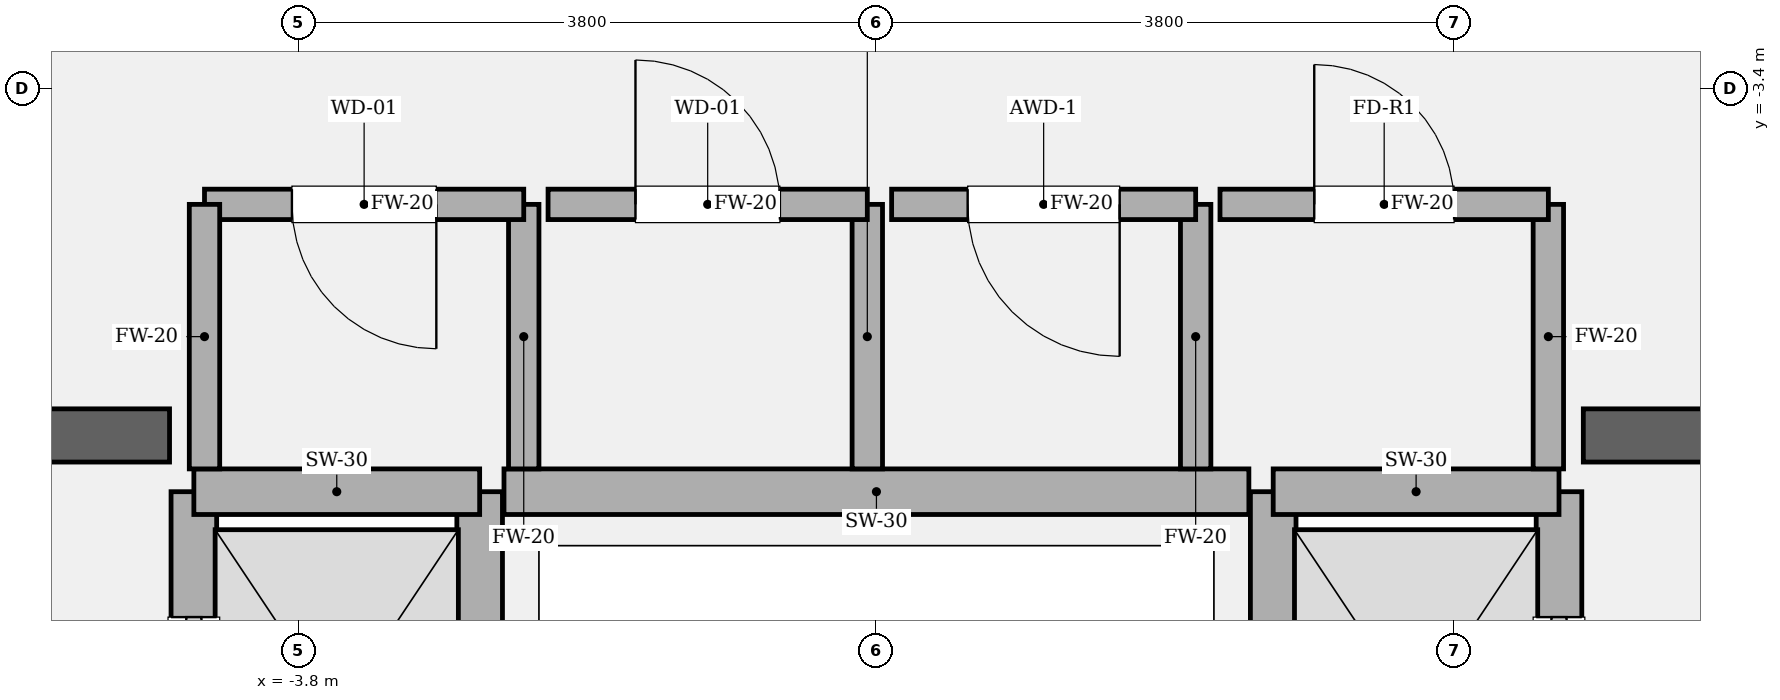
"""IFC4 building model, lengths in metres.
Left out: names, types, materials, properties, quantities, classifications, styles, units other than length and angle.
Written with IfcOpenShell. Run it as: python <this file> out.ifc"""

import sys

from ifc_helpers import new_model, si_unit, direction, frame, frame_2d, origin, place, context, subcontext, project, spatial, rectangle, extrude, element, fill, save


model = new_model("IFC4")
c1 = context("Model", 3, precision=1e-05, world=origin(), true_north=direction((0.0, 1.0)))
c2 = subcontext(c1, "Body", "Model", "MODEL_VIEW")
j1 = project(units=[si_unit("LENGTHUNIT", "METRE"), si_unit("PLANEANGLEUNIT", "RADIAN")], contexts=[c1])
p1 = place(None, origin())
s1 = spatial("IfcSite", under=j1, at=p1, CompositionType="ELEMENT")
p2 = place(p1, origin())
s2 = spatial("IfcBuilding", under=s1, at=p2, CompositionType="ELEMENT")
p3 = place(p2, frame((0.0, 0.0, 130.2)))
s3 = spatial("IfcBuildingStorey", under=s2, at=p3, CompositionType="ELEMENT", Elevation=130.2)
p4 = place(p3, frame((-9.875, -5.68, 0.0), z_axis=(0.0, 0.0, 1.0), x_axis=(1.0, 0.0, 0.0)))
e1 = element("IfcWall", 1, at=p4, inside=s3, PredefinedType="SOLIDWALL", context=c2, shape_type="SweptSolid", body=[
    extrude(rectangle(XDim=5.225, YDim=0.35, at=frame_2d((2.613, 0.0))), origin(), (0.0, 0.0, 1.0), 4.8),
])
p5 = place(p4, frame((1.335, 0.0, 0.0)))
e2 = element("IfcOpeningElement", 2, at=p5, cuts=e1, PredefinedType="OPENING", context=c2, shape_type="SweptSolid", body=[
    extrude(rectangle(XDim=1.18, YDim=2.2, at=frame_2d((0.59, 1.1))), frame((0.0, 0.185, 0.0), z_axis=(0.0, -1.0, 0.0), x_axis=(1.0, 0.0, 0.0)), (0.0, 0.0, 1.0), 0.37),
])
p6 = place(p3, frame((4.65, -5.68, 0.0), z_axis=(0.0, 0.0, 1.0), x_axis=(1.0, 0.0, 0.0)))
e3 = element("IfcWall", 3, at=p6, inside=s3, PredefinedType="SOLIDWALL", context=c2, shape_type="SweptSolid", body=[
    extrude(rectangle(XDim=5.225, YDim=0.35, at=frame_2d((2.613, 0.0))), origin(), (0.0, 0.0, 1.0), 4.8),
])
p7 = place(p6, frame((2.71, 0.0, 0.0)))
e4 = element("IfcOpeningElement", 4, at=p7, cuts=e3, PredefinedType="OPENING", context=c2, shape_type="SweptSolid", body=[
    extrude(rectangle(XDim=1.18, YDim=2.2, at=frame_2d((0.59, 1.1))), frame((0.0, 0.185, 0.0), z_axis=(0.0, -1.0, 0.0), x_axis=(1.0, 0.0, 0.0)), (0.0, 0.0, 1.0), 0.37),
])
p8 = place(p3, frame((-4.49, -8.82, 0.0), z_axis=(0.0, 0.0, 1.0), x_axis=(0.0, 1.0, 0.0)))
e5 = element("IfcWall", 5, at=p8, inside=s3, PredefinedType="SOLIDWALL", context=c2, shape_type="SweptSolid", body=[
    extrude(rectangle(XDim=2.77, YDim=0.3, at=frame_2d((1.385, 0.0))), origin(), (0.0, 0.0, 1.0), 4.54),
])
p9 = place(p8, frame((0.825, 0.0, 0.0)))
e6 = element("IfcOpeningElement", 6, at=p9, cuts=e5, PredefinedType="OPENING", context=c2, shape_type="SweptSolid", body=[
    extrude(rectangle(XDim=1.12, YDim=2.25, at=frame_2d((0.56, 1.125))), frame((0.0, 0.16, 0.0), z_axis=(0.0, -1.0, 0.0), x_axis=(1.0, 0.0, 0.0)), (0.0, 0.0, 1.0), 0.32),
])
p10 = place(p3, frame((-2.61, -8.82, 0.0), z_axis=(0.0, 0.0, 1.0), x_axis=(0.0, 1.0, 0.0)))
e7 = element("IfcWall", 7, at=p10, inside=s3, PredefinedType="SOLIDWALL", context=c2, shape_type="SweptSolid", body=[
    extrude(rectangle(XDim=2.77, YDim=0.3, at=frame_2d((1.385, 0.0))), origin(), (0.0, 0.0, 1.0), 4.54),
])
p11 = place(p3, frame((-4.49, -6.05, 0.0), z_axis=(0.0, 0.0, 1.0), x_axis=(1.0, 0.0, 0.0)))
e8 = element("IfcWall", 8, at=p11, inside=s3, PredefinedType="SOLIDWALL", context=c2, shape_type="SweptSolid", body=[
    extrude(rectangle(XDim=1.88, YDim=0.3, at=frame_2d((0.94, 0.0))), origin(), (0.0, 0.0, 1.0), 4.54),
])
p12 = place(p3, frame((4.49, -8.82, 0.0), z_axis=(0.0, 0.0, 1.0), x_axis=(0.0, 1.0, 0.0)))
e9 = element("IfcWall", 9, at=p12, inside=s3, PredefinedType="SOLIDWALL", context=c2, shape_type="SweptSolid", body=[
    extrude(rectangle(XDim=2.77, YDim=0.3, at=frame_2d((1.385, 0.0))), origin(), (0.0, 0.0, 1.0), 4.54),
])
p13 = place(p12, frame((0.825, 0.0, 0.0)))
e10 = element("IfcOpeningElement", 10, at=p13, cuts=e9, PredefinedType="OPENING", context=c2, shape_type="SweptSolid", body=[
    extrude(rectangle(XDim=1.12, YDim=2.25, at=frame_2d((0.56, 1.125))), frame((0.0, 0.16, 0.0), z_axis=(0.0, -1.0, 0.0), x_axis=(1.0, 0.0, 0.0)), (0.0, 0.0, 1.0), 0.32),
])
p14 = place(p3, frame((2.61, -8.82, 0.0), z_axis=(0.0, 0.0, 1.0), x_axis=(0.0, 1.0, 0.0)))
e11 = element("IfcWall", 11, at=p14, inside=s3, PredefinedType="SOLIDWALL", context=c2, shape_type="SweptSolid", body=[
    extrude(rectangle(XDim=2.77, YDim=0.3, at=frame_2d((1.385, 0.0))), origin(), (0.0, 0.0, 1.0), 4.54),
])
p15 = place(p3, frame((2.61, -6.05, 0.0), z_axis=(0.0, 0.0, 1.0), x_axis=(1.0, 0.0, 0.0)))
e12 = element("IfcWall", 12, at=p15, inside=s3, PredefinedType="SOLIDWALL", context=c2, shape_type="SweptSolid", body=[
    extrude(rectangle(XDim=1.88, YDim=0.3, at=frame_2d((0.94, 0.0))), origin(), (0.0, 0.0, 1.0), 4.54),
])
p16 = place(p3, frame((-2.45, -6.05, 0.0), z_axis=(0.0, 0.0, 1.0), x_axis=(1.0, 0.0, 0.0)))
e13 = element("IfcWall", 13, at=p16, inside=s3, PredefinedType="SOLIDWALL", context=c2, shape_type="SweptSolid", body=[
    extrude(rectangle(XDim=4.9, YDim=0.3, at=frame_2d((2.45, 0.0))), origin(), (0.0, 0.0, 1.0), 4.54),
])
p17 = place(p3, frame((-2.32, -5.9, 0.0), z_axis=(0.0, 0.0, 1.0), x_axis=(0.0, 1.0, 0.0)))
e14 = element("IfcWall", 14, at=p17, inside=s3, PredefinedType="SOLIDWALL", context=c2, shape_type="SweptSolid", body=[
    extrude(rectangle(XDim=1.74, YDim=0.2, at=frame_2d((0.87, 0.0))), origin(), (0.0, 0.0, 1.0), 4.54),
])
p18 = place(p3, frame((-2.32, -4.16, 0.0), z_axis=(0.0, 0.0, 1.0), x_axis=(-1.0, 0.0, 0.0)))
e15 = element("IfcWall", 15, at=p18, inside=s3, PredefinedType="SOLIDWALL", context=c2, shape_type="SweptSolid", body=[
    extrude(rectangle(XDim=2.1, YDim=0.2, at=frame_2d((1.05, 0.0))), origin(), (0.0, 0.0, 1.0), 4.54),
])
p19 = place(p18, frame((0.575, 0.0, 0.0)))
e16 = element("IfcOpeningElement", 16, at=p19, cuts=e15, PredefinedType="OPENING", context=c2, shape_type="SweptSolid", body=[
    extrude(rectangle(XDim=0.95, YDim=2.15, at=frame_2d((0.475, 1.075))), frame((0.0, 0.11, 0.0), z_axis=(0.0, -1.0, 0.0), x_axis=(1.0, 0.0, 0.0)), (0.0, 0.0, 1.0), 0.22),
])
for number, where, z_axis, x_axis in (
    (17, (-4.42, -4.16, 0.0), (0.0, 0.0, 1.0), (0.0, -1.0, 0.0)),
    (18, (-0.06, -5.9, 0.0), (0.0, 0.0, 1.0), (0.0, 1.0, 0.0)),
):
    element("IfcWall", number, at=place(p3, frame(where, z_axis=z_axis, x_axis=x_axis)), inside=s3, PredefinedType="SOLIDWALL", context=c2, shape_type="SweptSolid", body=[
        extrude(rectangle(XDim=1.74, YDim=0.2, at=frame_2d((0.87, 0.0))), origin(), (0.0, 0.0, 1.0), 4.54),
    ])
p20 = place(p3, frame((-0.06, -4.16, 0.0), z_axis=(0.0, 0.0, 1.0), x_axis=(-1.0, 0.0, 0.0)))
e19 = element("IfcWall", 19, at=p20, inside=s3, PredefinedType="SOLIDWALL", context=c2, shape_type="SweptSolid", body=[
    extrude(rectangle(XDim=2.1, YDim=0.2, at=frame_2d((1.05, 0.0))), origin(), (0.0, 0.0, 1.0), 4.54),
])
p21 = place(p20, frame((0.575, 0.0, 0.0)))
e20 = element("IfcOpeningElement", 20, at=p21, cuts=e19, PredefinedType="OPENING", context=c2, shape_type="SweptSolid", body=[
    extrude(rectangle(XDim=0.95, YDim=2.15, at=frame_2d((0.475, 1.075))), frame((0.0, 0.11, 0.0), z_axis=(0.0, -1.0, 0.0), x_axis=(1.0, 0.0, 0.0)), (0.0, 0.0, 1.0), 0.22),
])
p22 = place(p3, frame((2.1, -5.9, 0.0), z_axis=(0.0, 0.0, 1.0), x_axis=(0.0, 1.0, 0.0)))
e21 = element("IfcWall", 21, at=p22, inside=s3, PredefinedType="SOLIDWALL", context=c2, shape_type="SweptSolid", body=[
    extrude(rectangle(XDim=1.74, YDim=0.2, at=frame_2d((0.87, 0.0))), origin(), (0.0, 0.0, 1.0), 4.54),
])
p23 = place(p3, frame((2.1, -4.16, 0.0), z_axis=(0.0, 0.0, 1.0), x_axis=(-1.0, 0.0, 0.0)))
e22 = element("IfcWall", 22, at=p23, inside=s3, PredefinedType="SOLIDWALL", context=c2, shape_type="SweptSolid", body=[
    extrude(rectangle(XDim=2.0, YDim=0.2, at=frame_2d((1.0, 0.0))), origin(), (0.0, 0.0, 1.0), 4.54),
])
p24 = place(p23, frame((0.5, 0.0, 0.0)))
e23 = element("IfcOpeningElement", 23, at=p24, cuts=e22, PredefinedType="OPENING", context=c2, shape_type="SweptSolid", body=[
    extrude(rectangle(XDim=1.0, YDim=2.15, at=frame_2d((0.5, 1.075))), frame((0.0, 0.11, 0.0), z_axis=(0.0, -1.0, 0.0), x_axis=(1.0, 0.0, 0.0)), (0.0, 0.0, 1.0), 0.22),
])
p25 = place(p3, frame((4.42, -5.9, 0.0), z_axis=(0.0, 0.0, 1.0), x_axis=(0.0, 1.0, 0.0)))
e24 = element("IfcWall", 24, at=p25, inside=s3, PredefinedType="SOLIDWALL", context=c2, shape_type="SweptSolid", body=[
    extrude(rectangle(XDim=1.74, YDim=0.2, at=frame_2d((0.87, 0.0))), origin(), (0.0, 0.0, 1.0), 4.54),
])
p26 = place(p3, frame((4.42, -4.16, 0.0), z_axis=(0.0, 0.0, 1.0), x_axis=(-1.0, 0.0, 0.0)))
e25 = element("IfcWall", 25, at=p26, inside=s3, PredefinedType="SOLIDWALL", context=c2, shape_type="SweptSolid", body=[
    extrude(rectangle(XDim=2.16, YDim=0.2, at=frame_2d((1.08, 0.0))), origin(), (0.0, 0.0, 1.0), 4.54),
])
p27 = place(p26, frame((0.62, 0.0, 0.0)))
e26 = element("IfcOpeningElement", 26, at=p27, cuts=e25, PredefinedType="OPENING", context=c2, shape_type="SweptSolid", body=[
    extrude(rectangle(XDim=0.92, YDim=2.1, at=frame_2d((0.46, 1.05))), frame((0.0, 0.11, 0.0), z_axis=(0.0, -1.0, 0.0), x_axis=(1.0, 0.0, 0.0)), (0.0, 0.0, 1.0), 0.22),
])
p28 = place(p9, origin())
e27 = element("IfcDoor", 27, at=p28, inside=s3, OperationType="SLIDING_TO_LEFT", PredefinedType="DOOR", context=c2, shape_type="SweptSolid", body=[
    extrude(rectangle(XDim=1.12, YDim=2.25, at=frame_2d((0.56, 1.125))), frame((0.0, 0.025, 0.0), z_axis=(0.0, -1.0, 0.0), x_axis=(1.0, 0.0, 0.0)), (0.0, 0.0, 1.0), 0.05),
])
fill(e6, e27)
p29 = place(p13, origin())
e28 = element("IfcDoor", 28, at=p29, inside=s3, OperationType="SLIDING_TO_RIGHT", PredefinedType="DOOR", context=c2, shape_type="SweptSolid", body=[
    extrude(rectangle(XDim=1.12, YDim=2.25, at=frame_2d((0.56, 1.125))), frame((0.0, 0.025, 0.0), z_axis=(0.0, -1.0, 0.0), x_axis=(1.0, 0.0, 0.0)), (0.0, 0.0, 1.0), 0.05),
])
fill(e10, e28)
p30 = place(p19, origin())
e29 = element("IfcDoor", 29, at=p30, inside=s3, OperationType="SINGLE_SWING_LEFT", PredefinedType="DOOR", context=c2, shape_type="SweptSolid", body=[
    extrude(rectangle(XDim=0.95, YDim=2.15, at=frame_2d((0.475, 1.075))), frame((0.0, 0.025, 0.0), z_axis=(0.0, -1.0, 0.0), x_axis=(1.0, 0.0, 0.0)), (0.0, 0.0, 1.0), 0.05),
])
fill(e16, e29)
p31 = place(p21, origin())
e30 = element("IfcDoor", 30, at=p31, inside=s3, OperationType="SINGLE_SWING_RIGHT", PredefinedType="DOOR", context=c2, shape_type="SweptSolid", body=[
    extrude(rectangle(XDim=0.95, YDim=2.15, at=frame_2d((0.475, 1.075))), frame((0.0, 0.025, 0.0), z_axis=(0.0, -1.0, 0.0), x_axis=(1.0, 0.0, 0.0)), (0.0, 0.0, 1.0), 0.05),
])
fill(e20, e30)
p32 = place(p24, origin())
e31 = element("IfcDoor", 31, at=p32, inside=s3, OperationType="SINGLE_SWING_LEFT", PredefinedType="DOOR", context=c2, shape_type="SweptSolid", body=[
    extrude(rectangle(XDim=1.0, YDim=2.15, at=frame_2d((0.5, 1.075))), frame((0.0, 0.025, 0.0), z_axis=(0.0, -1.0, 0.0), x_axis=(1.0, 0.0, 0.0)), (0.0, 0.0, 1.0), 0.05),
])
fill(e23, e31)
p33 = place(p27, origin())
e32 = element("IfcDoor", 32, at=p33, inside=s3, OperationType="SINGLE_SWING_RIGHT", PredefinedType="DOOR", context=c2, shape_type="SweptSolid", body=[
    extrude(rectangle(XDim=0.92, YDim=2.1, at=frame_2d((0.46, 1.05))), frame((0.0, 0.025, 0.0), z_axis=(0.0, -1.0, 0.0), x_axis=(1.0, 0.0, 0.0)), (0.0, 0.0, 1.0), 0.05),
])
fill(e26, e32)
save(model, sys.argv[1])
